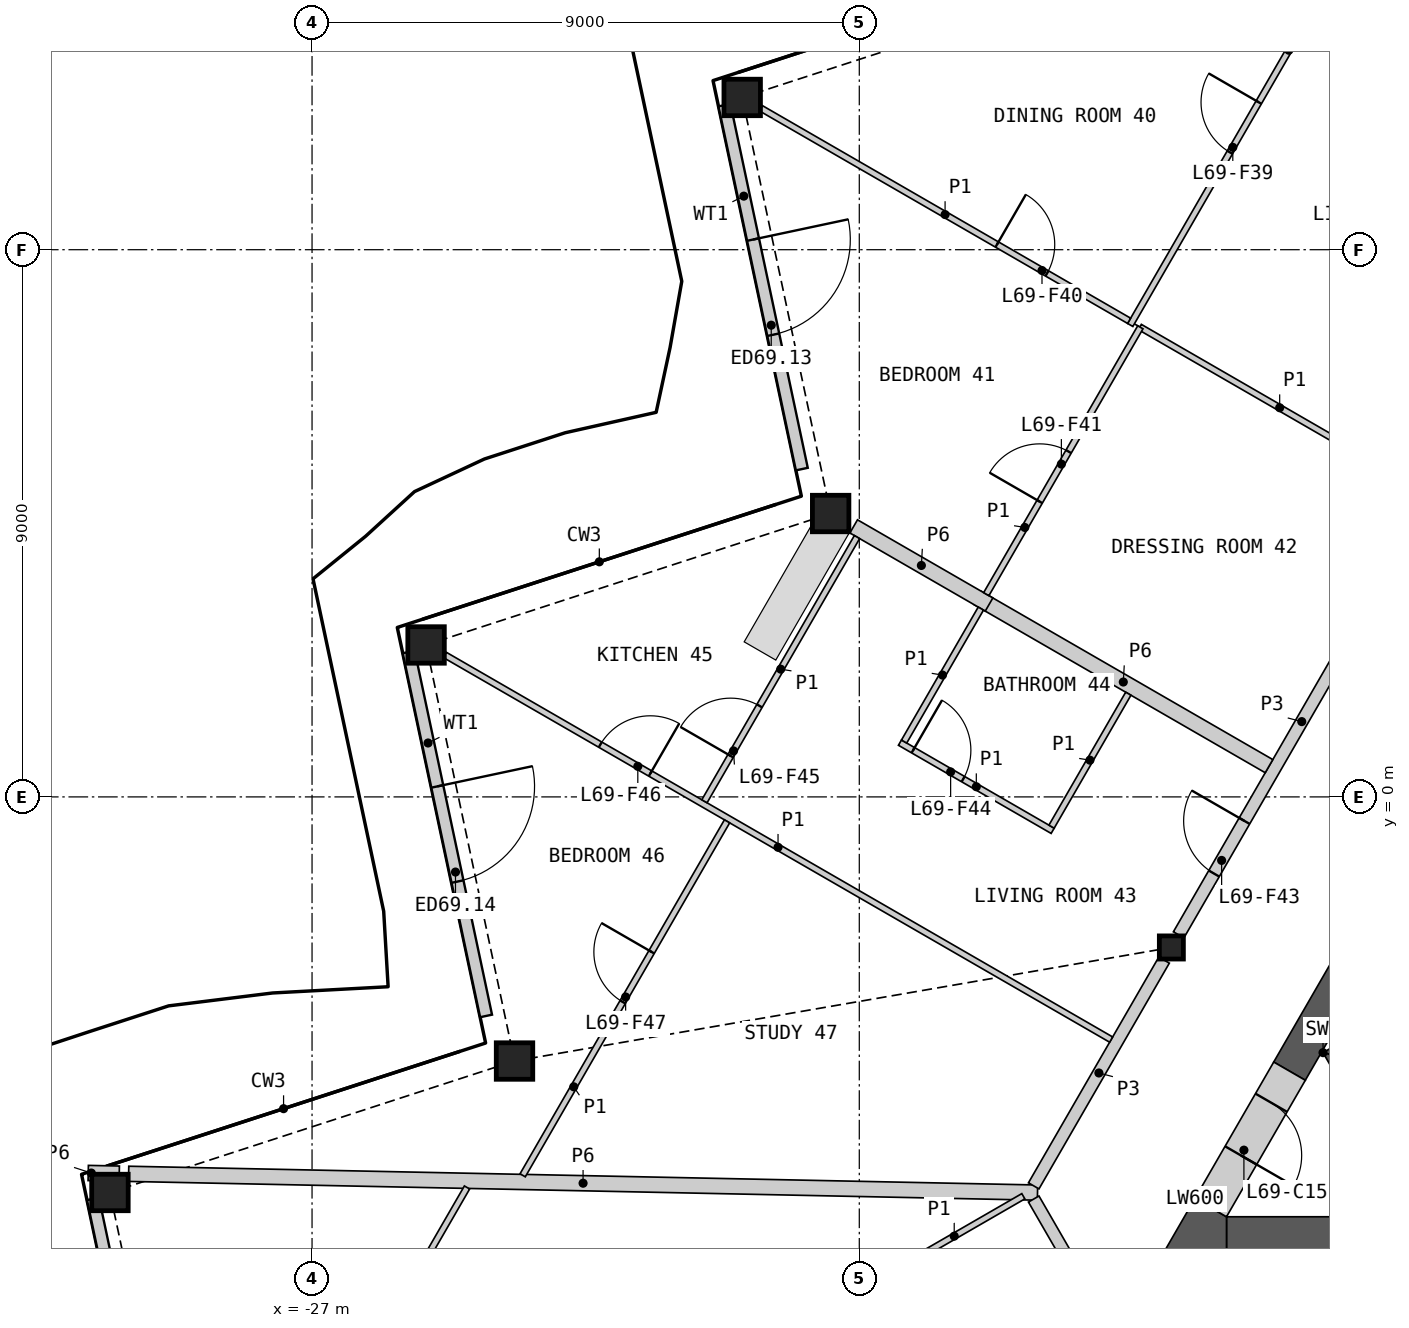
"""IFC4 building model, lengths in metres.
Left out: names, types, materials, properties, quantities, classifications, styles, units other than length and angle.
Written with IfcOpenShell. Run it as: python <this file> out.ifc"""

import sys

from ifc_helpers import new_model, si_unit, direction, frame, frame_2d, origin, origin_2d, place, context, subcontext, project, spatial, polyline, rectangle, hollow_rectangle, i_section, outline, extrude, element, fill, save


model = new_model("IFC4")
c1 = context("Model", 3, precision=1e-05, world=origin(), true_north=direction((0.0, 1.0)))
c2 = subcontext(c1, "Body", "Model", "MODEL_VIEW")
j1 = project(units=[si_unit("LENGTHUNIT", "METRE"), si_unit("PLANEANGLEUNIT", "RADIAN")], contexts=[c1])
p1 = place(None, origin())
s1 = spatial("IfcSite", under=j1, at=p1, CompositionType="ELEMENT")
p2 = place(p1, origin())
s2 = spatial("IfcBuilding", under=s1, at=p2, CompositionType="ELEMENT")
p3 = place(p2, frame((0.0, 0.0, 315.4)))
s3 = spatial("IfcBuildingStorey", under=s2, at=p3, CompositionType="ELEMENT", Elevation=315.4)
for number, where, z_axis, x_axis in (
    (1, (-19.926, 11.504, 0.0), (0.0, 0.0, 1.0), (1.0, 0.0, 0.0)),
    (2, (-18.471, 4.661, 0.0), (0.0, 0.0, 1.0), (1.0, 0.0, 0.0)),
    (3, (-25.125, 2.499, 0.0), (0.0, 0.0, 1.0), (1.0, 0.0, 0.0)),
    (4, (-23.67, -4.344, 0.0), (0.0, 0.0, 1.0), (1.0, 0.0, 0.0)),
    (5, (-30.324, -6.506, 0.0), (0.0, 0.0, 1.0), (1.0, 0.0, 0.0)),
):
    element("IfcColumn", number, at=place(p3, frame(where, z_axis=z_axis, x_axis=x_axis)), inside=s3, PredefinedType="COLUMN", context=c2, shape_type="SweptSolid", body=[
        extrude(hollow_rectangle(XDim=0.6, YDim=0.6, WallThickness=0.04, at=origin_2d()), origin(), (0.0, 0.0, 1.0), 3.4),
    ])
p4 = place(p3, frame((-12.868, -2.476, 0.0), z_axis=(0.0, 0.0, 1.0), x_axis=(1.0, 0.0, 0.0)))
e6 = element("IfcColumn", 6, at=p4, inside=s3, PredefinedType="COLUMN", context=c2, shape_type="SweptSolid", body=[
    extrude(i_section(OverallWidth=0.396, OverallDepth=0.381, WebThickness=0.019, FlangeThickness=0.03, at=origin_2d()), origin(), (0.0, 0.0, 1.0), 3.4),
])
p5 = place(p3, frame((-20.217, 11.377, 0.0), z_axis=(0.0, 0.0, 1.0), x_axis=(0.207885951908, -0.978153071354, 0.0)))
e7 = element("IfcWall", 7, at=p5, inside=s3, PredefinedType="SOLIDWALL", context=c2, shape_type="SweptSolid", body=[
    extrude(rectangle(XDim=6.12, YDim=0.2, at=frame_2d((3.06, 0.0))), origin(), (0.0, 0.0, 1.0), 2.488),
])
p6 = place(p5, frame((2.26, 0.0, 0.0)))
e8 = element("IfcOpeningElement", 8, at=p6, cuts=e7, PredefinedType="OPENING", context=c2, shape_type="SweptSolid", body=[
    extrude(rectangle(XDim=1.6, YDim=2.25, at=frame_2d((0.8, 1.125))), frame((0.0, 0.11, 0.0), z_axis=(0.0, -1.0, 0.0), x_axis=(1.0, 0.0, 0.0)), (0.0, 0.0, 1.0), 0.22),
])
p7 = place(p3, frame((-25.41, 2.383, 0.0), z_axis=(0.0, 0.0, 1.0), x_axis=(0.207894064368, -0.978151347185, 0.0)))
e9 = element("IfcWall", 9, at=p7, inside=s3, PredefinedType="SOLIDWALL", context=c2, shape_type="SweptSolid", body=[
    extrude(rectangle(XDim=6.12, YDim=0.2, at=frame_2d((3.06, 0.0))), origin(), (0.0, 0.0, 1.0), 2.488),
])
p8 = place(p7, frame((2.26, 0.0, 0.0)))
e10 = element("IfcOpeningElement", 10, at=p8, cuts=e9, PredefinedType="OPENING", context=c2, shape_type="SweptSolid", body=[
    extrude(rectangle(XDim=1.6, YDim=2.25, at=frame_2d((0.8, 1.125))), frame((0.0, 0.11, 0.0), z_axis=(0.0, -1.0, 0.0), x_axis=(1.0, 0.0, 0.0)), (0.0, 0.0, 1.0), 0.22),
])
p9 = place(p3, frame((-30.603, -6.611, 0.0), z_axis=(0.0, 0.0, 1.0), x_axis=(0.207921893309, -0.978145432072, 0.0)))
e11 = element("IfcWall", 11, at=p9, inside=s3, PredefinedType="SOLIDWALL", context=c2, shape_type="SweptSolid", body=[
    extrude(rectangle(XDim=6.475, YDim=0.2, at=frame_2d((3.237, 0.0))), origin(), (0.0, 0.0, 1.0), 2.488),
])
p10 = place(p9, frame((2.26, 0.0, 0.0)))
e12 = element("IfcOpeningElement", 12, at=p10, cuts=e11, PredefinedType="OPENING", context=c2, shape_type="SweptSolid", body=[
    extrude(rectangle(XDim=1.6, YDim=2.25, at=frame_2d((0.8, 1.125))), frame((0.0, 0.11, 0.0), z_axis=(0.0, -1.0, 0.0), x_axis=(1.0, 0.0, 0.0)), (0.0, 0.0, 1.0), 0.22),
])
p11 = place(p3, origin())
e13 = element("IfcWall", 13, at=p11, inside=s3, PredefinedType="SHEAR", context=c2, shape_type="SweptSolid", body=[
    extrude(outline(polyline([(-5.307, -1.281), (-10.374, -4.206), (-10.032, -4.298), (-5.182, -1.498), (-5.307, -1.281)])), origin(), (0.0, 0.0, 1.0), 3.1),
])
p12 = place(p3, origin())
e14 = element("IfcWall", 14, at=p12, inside=s3, PredefinedType="SHEAR", context=c2, shape_type="SweptSolid", body=[
    extrude(outline(polyline([(-10.374, -4.206), (-8.83, -6.881), (-8.738, -6.539), (-10.032, -4.298), (-10.374, -4.206)])), origin(), (0.0, 0.0, 1.0), 3.1),
])
p13 = place(p3, frame((-11.961, -7.206, 0.0), z_axis=(0.0, 0.0, 1.0), x_axis=(1.0, 0.0, 0.0)))
e15 = element("IfcWall", 15, at=p13, inside=s3, PredefinedType="SHEAR", context=c2, shape_type="SweptSolid", body=[
    extrude(rectangle(XDim=23.921, YDim=0.6, at=frame_2d((11.961, 0.0))), origin(), (0.0, 0.0, 1.0), 3.1),
])
p14 = place(p3, frame((-8.44, -0.208, 0.0), z_axis=(0.0, 0.0, 1.0), x_axis=(-0.500007425856, -0.866021116422, 0.0)))
e16 = element("IfcWall", 16, at=p14, inside=s3, PredefinedType="SHEAR", context=c2, shape_type="SweptSolid", body=[
    extrude(rectangle(XDim=4.969, YDim=0.6, at=frame_2d((2.484, 0.0))), origin(), (0.0, 0.0, 1.0), 3.1),
])
p15 = place(p3, origin())
e17 = element("IfcWall", 17, at=p15, inside=s3, PredefinedType="SHEAR", context=c2, shape_type="SweptSolid", body=[
    extrude(outline(polyline([(-12.48, -6.606), (-11.961, -6.906), (-11.961, -7.506), (-13.0, -7.506), (-12.48, -6.606)])), origin(), (0.0, 0.0, 1.0), 3.1),
])
p16 = place(p3, frame((-10.925, -4.511, 0.0), z_axis=(0.0, 0.0, 1.0), x_axis=(-0.500018667571, -0.866014625789, 0.0)))
e18 = element("IfcWall", 18, at=p16, inside=s3, PredefinedType="SHEAR", context=c2, shape_type="SweptSolid", body=[
    extrude(rectangle(XDim=2.592, YDim=0.6, at=frame_2d((1.296, 0.0))), origin(), (0.0, 0.0, 1.0), 3.1),
])
p17 = place(p16, frame((0.6, 0.0, 0.0)))
e19 = element("IfcOpeningElement", 19, at=p17, cuts=e18, PredefinedType="OPENING", context=c2, shape_type="SweptSolid", body=[
    extrude(rectangle(XDim=1.0, YDim=2.1, at=frame_2d((0.5, 1.05))), frame((0.0, 0.31, 0.0), z_axis=(0.0, -1.0, 0.0), x_axis=(1.0, 0.0, 0.0)), (0.0, 0.0, 1.0), 0.62),
])
p18 = place(p3, frame((-30.016, -6.199, 0.0), z_axis=(0.0, 0.0, 1.0), x_axis=(0.999786619639, -0.02065708573, 0.0)))
e20 = element("IfcWall", 20, at=p18, inside=s3, PredefinedType="PARTITIONING", context=c2, shape_type="SweptSolid", body=[
    extrude(rectangle(XDim=14.951, YDim=0.25, at=frame_2d((7.475, 0.0))), origin(), (0.0, 0.0, 1.0), 2.33),
])
p19 = place(p3, frame((-12.748, -2.269, 0.0), z_axis=(0.0, 0.0, 1.0), x_axis=(0.499984266882, 0.866034487114, 0.0)))
e21 = element("IfcWall", 21, at=p19, inside=s3, PredefinedType="PARTITIONING", context=c2, shape_type="SweptSolid", body=[
    extrude(rectangle(XDim=8.099, YDim=0.2, at=frame_2d((4.049, 0.0))), origin(), (0.0, 0.0, 1.0), 3.1),
])
p20 = place(p19, frame((1.164, 0.0, 0.0)))
e22 = element("IfcOpeningElement", 22, at=p20, cuts=e21, PredefinedType="OPENING", context=c2, shape_type="SweptSolid", body=[
    extrude(rectangle(XDim=1.0, YDim=2.1, at=frame_2d((0.5, 1.05))), frame((0.0, 0.11, 0.0), z_axis=(0.0, -1.0, 0.0), x_axis=(1.0, 0.0, 0.0)), (0.0, 0.0, 1.0), 0.22),
])
p21 = place(p3, frame((-16.055, 3.273, 0.0), z_axis=(0.0, 0.0, 1.0), x_axis=(0.866019581949, -0.500010083578, 0.0)))
e23 = element("IfcWall", 23, at=p21, inside=s3, PredefinedType="PARTITIONING", context=c2, shape_type="SweptSolid", body=[
    extrude(rectangle(XDim=5.535, YDim=0.25, at=frame_2d((2.768, 0.0))), origin(), (0.0, 0.0, 1.0), 2.33),
])
p22 = place(p3, frame((-15.131, -6.397, 0.0), z_axis=(0.0, 0.0, 1.0), x_axis=(0.500003406062, 0.866023437285, 0.0)))
e24 = element("IfcWall", 24, at=p22, inside=s3, PredefinedType="PARTITIONING", context=c2, shape_type="SweptSolid", body=[
    extrude(rectangle(XDim=4.288, YDim=0.2, at=frame_2d((2.144, 0.0))), origin(), (0.0, 0.0, 1.0), 3.1),
])
p23 = place(p3, frame((-15.131, -6.614, 0.0), z_axis=(0.0, 0.0, 1.0), x_axis=(0.499967746641, -0.866044024469, 0.0)))
e25 = element("IfcWall", 25, at=p23, inside=s3, PredefinedType="PARTITIONING", context=c2, shape_type="SweptSolid", body=[
    extrude(rectangle(XDim=3.676, YDim=0.2, at=frame_2d((1.838, 0.0))), origin(), (0.0, 0.0, 1.0), 3.1),
])
p24 = place(p23, frame((2.426, 0.0, 0.0)))
e26 = element("IfcOpeningElement", 26, at=p24, cuts=e25, PredefinedType="OPENING", context=c2, shape_type="SweptSolid", body=[
    extrude(rectangle(XDim=1.0, YDim=2.1, at=frame_2d((0.5, 1.05))), frame((0.0, 0.11, 0.0), z_axis=(0.0, -1.0, 0.0), x_axis=(1.0, 0.0, 0.0)), (0.0, 0.0, 1.0), 0.22),
])
p25 = place(p3, frame((-18.092, 4.449, 0.0), z_axis=(0.0, 0.0, 1.0), x_axis=(0.866043267704, -0.499969057507, 0.0)))
e27 = element("IfcWall", 27, at=p25, inside=s3, PredefinedType="PARTITIONING", context=c2, shape_type="SweptSolid", body=[
    extrude(rectangle(XDim=2.571, YDim=0.25, at=frame_2d((1.286, 0.0))), origin(), (0.0, 0.0, 1.0), 2.33),
])
p26 = place(p3, frame((-30.681, -6.186, 0.0), z_axis=(0.0, 0.0, 1.0), x_axis=(0.999788216533, -0.020579652135, 0.0)))
e28 = element("IfcWall", 28, at=p26, inside=s3, PredefinedType="PARTITIONING", context=c2, shape_type="SweptSolid", body=[
    extrude(rectangle(XDim=0.51, YDim=0.25, at=frame_2d((0.255, 0.0))), origin(), (0.0, 0.0, 1.0), 2.33),
])
p27 = place(p3, frame((-24.815, 2.334, 0.0), z_axis=(0.0, 0.0, 1.0), x_axis=(0.866024591023, -0.500001407741, 0.0)))
e29 = element("IfcWall", 29, at=p27, inside=s3, PredefinedType="PARTITIONING", context=c2, shape_type="SweptSolid", body=[
    extrude(rectangle(XDim=12.652, YDim=0.1, at=frame_2d((6.326, 0.0))), origin(), (0.0, 0.0, 1.0), 2.33),
])
p28 = place(p27, frame((2.95, 0.0, 0.0)))
e30 = element("IfcOpeningElement", 30, at=p28, cuts=e29, PredefinedType="OPENING", context=c2, shape_type="SweptSolid", body=[
    extrude(rectangle(XDim=0.95, YDim=2.1, at=frame_2d((0.475, 1.05))), frame((0.0, 0.06, 0.0), z_axis=(0.0, -1.0, 0.0), x_axis=(1.0, 0.0, 0.0)), (0.0, 0.0, 1.0), 0.12),
])
p29 = place(p3, frame((-13.544, 7.762, 0.0), z_axis=(0.0, 0.0, 1.0), x_axis=(0.499993819111, 0.866028972293, 0.0)))
e31 = element("IfcWall", 31, at=p29, inside=s3, PredefinedType="PARTITIONING", context=c2, shape_type="SweptSolid", body=[
    extrude(rectangle(XDim=10.436, YDim=0.1, at=frame_2d((5.218, 0.0))), origin(), (0.0, 0.0, 1.0), 2.33),
])
p30 = place(p29, frame((3.279, 0.0, 0.0)))
e32 = element("IfcOpeningElement", 32, at=p30, cuts=e31, PredefinedType="OPENING", context=c2, shape_type="SweptSolid", body=[
    extrude(rectangle(XDim=0.95, YDim=2.1, at=frame_2d((0.475, 1.05))), frame((0.0, 0.06, 0.0), z_axis=(0.0, -1.0, 0.0), x_axis=(1.0, 0.0, 0.0)), (0.0, 0.0, 1.0), 0.12),
])
p31 = place(p3, frame((-19.615, 11.325, 0.0), z_axis=(0.0, 0.0, 1.0), x_axis=(0.866013987544, -0.500019772988, 0.0)))
e33 = element("IfcWall", 33, at=p31, inside=s3, PredefinedType="PARTITIONING", context=c2, shape_type="SweptSolid", body=[
    extrude(rectangle(XDim=6.99, YDim=0.1, at=frame_2d((3.495, 0.0))), origin(), (0.0, 0.0, 1.0), 2.33),
])
p32 = place(p31, frame((4.48, 0.0, 0.0)))
e34 = element("IfcOpeningElement", 34, at=p32, cuts=e33, PredefinedType="OPENING", context=c2, shape_type="SweptSolid", body=[
    extrude(rectangle(XDim=0.95, YDim=2.1, at=frame_2d((0.475, 1.05))), frame((0.0, 0.06, 0.0), z_axis=(0.0, -1.0, 0.0), x_axis=(1.0, 0.0, 0.0)), (0.0, 0.0, 1.0), 0.12),
])
p33 = place(p3, frame((-23.536, -6.224, 0.0), z_axis=(0.0, 0.0, 1.0), x_axis=(0.500002256251, 0.866024101133, 0.0)))
e35 = element("IfcWall", 35, at=p33, inside=s3, PredefinedType="PARTITIONING", context=c2, shape_type="SweptSolid", body=[
    extrude(rectangle(XDim=6.722, YDim=0.1, at=frame_2d((3.361, 0.0))), origin(), (0.0, 0.0, 1.0), 2.33),
])
p34 = place(p33, frame((3.292, 0.0, 0.0)))
e36 = element("IfcOpeningElement", 36, at=p34, cuts=e35, PredefinedType="OPENING", context=c2, shape_type="SweptSolid", body=[
    extrude(rectangle(XDim=0.95, YDim=2.1, at=frame_2d((0.475, 1.05))), frame((0.0, 0.06, 0.0), z_axis=(0.0, -1.0, 0.0), x_axis=(1.0, 0.0, 0.0)), (0.0, 0.0, 1.0), 0.12),
])
p35 = place(p3, frame((-13.386, 7.729, 0.0), z_axis=(0.0, 0.0, 1.0), x_axis=(0.866034036823, -0.49998504684, 0.0)))
e37 = element("IfcWall", 37, at=p35, inside=s3, PredefinedType="PARTITIONING", context=c2, shape_type="SweptSolid", body=[
    extrude(rectangle(XDim=5.312, YDim=0.1, at=frame_2d((2.656, 0.0))), origin(), (0.0, 0.0, 1.0), 2.33),
])
p36 = place(p3, frame((-15.912, 3.335, 0.0), z_axis=(0.0, 0.0, 1.0), x_axis=(0.49999906822, 0.866025941747, 0.0)))
e38 = element("IfcWall", 38, at=p36, inside=s3, PredefinedType="PARTITIONING", context=c2, shape_type="SweptSolid", body=[
    extrude(rectangle(XDim=5.068, YDim=0.1, at=frame_2d((2.534, 0.0))), origin(), (0.0, 0.0, 1.0), 2.33),
])
p37 = place(p36, frame((1.757, 0.0, 0.0)))
e39 = element("IfcOpeningElement", 39, at=p37, cuts=e38, PredefinedType="OPENING", context=c2, shape_type="SweptSolid", body=[
    extrude(rectangle(XDim=0.95, YDim=2.1, at=frame_2d((0.475, 1.05))), frame((0.0, 0.06, 0.0), z_axis=(0.0, -1.0, 0.0), x_axis=(1.0, 0.0, 0.0)), (0.0, 0.0, 1.0), 0.12),
])
p38 = place(p3, frame((-20.547, -0.072, 0.0), z_axis=(0.0, 0.0, 1.0), x_axis=(0.499969537666, 0.866042990507, 0.0)))
e40 = element("IfcWall", 40, at=p38, inside=s3, PredefinedType="PARTITIONING", context=c2, shape_type="SweptSolid", body=[
    extrude(rectangle(XDim=5.018, YDim=0.1, at=frame_2d((2.509, 0.0))), origin(), (0.0, 0.0, 1.0), 2.33),
])
p39 = place(p38, frame((0.862, 0.0, 0.0)))
e41 = element("IfcOpeningElement", 41, at=p39, cuts=e40, PredefinedType="OPENING", context=c2, shape_type="SweptSolid", body=[
    extrude(rectangle(XDim=0.95, YDim=2.1, at=frame_2d((0.475, 1.05))), frame((0.0, 0.06, 0.0), z_axis=(0.0, -1.0, 0.0), x_axis=(1.0, 0.0, 0.0)), (0.0, 0.0, 1.0), 0.12),
])
p40 = place(p3, frame((-26.736, -10.38, 0.0), z_axis=(0.0, 0.0, 1.0), x_axis=(0.500024700597, 0.866011142419, 0.0)))
e42 = element("IfcWall", 42, at=p40, inside=s3, PredefinedType="PARTITIONING", context=c2, shape_type="SweptSolid", body=[
    extrude(rectangle(XDim=4.568, YDim=0.1, at=frame_2d((2.284, 0.0))), origin(), (0.0, 0.0, 1.0), 2.33),
])
p41 = place(p40, frame((0.652, 0.0, 0.0)))
e43 = element("IfcOpeningElement", 43, at=p41, cuts=e42, PredefinedType="OPENING", context=c2, shape_type="SweptSolid", body=[
    extrude(rectangle(XDim=0.95, YDim=2.1, at=frame_2d((0.475, 1.05))), frame((0.0, 0.06, 0.0), z_axis=(0.0, -1.0, 0.0), x_axis=(1.0, 0.0, 0.0)), (0.0, 0.0, 1.0), 0.12),
])
p42 = place(p3, frame((-17.331, 0.892, 0.0), z_axis=(0.0, 0.0, 1.0), x_axis=(0.866032775405, -0.499987231761, 0.0)))
e44 = element("IfcWall", 44, at=p42, inside=s3, PredefinedType="PARTITIONING", context=c2, shape_type="SweptSolid", body=[
    extrude(rectangle(XDim=2.9, YDim=0.1, at=frame_2d((1.45, 0.0))), origin(), (0.0, 0.0, 1.0), 2.33),
])
p43 = place(p42, frame((0.25, 0.0, 0.0)))
e45 = element("IfcOpeningElement", 45, at=p43, cuts=e44, PredefinedType="OPENING", context=c2, shape_type="SweptSolid", body=[
    extrude(rectangle(XDim=0.95, YDim=2.1, at=frame_2d((0.475, 1.05))), frame((0.0, 0.06, 0.0), z_axis=(0.0, -1.0, 0.0), x_axis=(1.0, 0.0, 0.0)), (0.0, 0.0, 1.0), 0.12),
])
for number, where, z_axis, x_axis in (
    (46, (-14.838, -0.489, 0.0), (0.0, 0.0, 1.0), (0.5, 0.866, 0.0)),
    (47, (-17.263, 0.911, 0.0), (0.0, 0.0, 1.0), (0.5, 0.866, 0.0)),
):
    element("IfcWall", number, at=place(p3, frame(where, z_axis=z_axis, x_axis=x_axis)), inside=s3, PredefinedType="PARTITIONING", context=c2, shape_type="SweptSolid", body=[
        extrude(rectangle(XDim=2.525, YDim=0.1, at=frame_2d((1.262, 0.0))), origin(), (0.0, 0.0, 1.0), 2.33),
    ])
p44 = place(p3, frame((-17.575, -7.881, 0.0), z_axis=(0.0, 0.0, 1.0), x_axis=(0.866013657776, 0.500020344131, 0.0)))
e48 = element("IfcWall", 48, at=p44, inside=s3, PredefinedType="PARTITIONING", context=c2, shape_type="SweptSolid", body=[
    extrude(rectangle(XDim=2.625, YDim=0.1, at=frame_2d((1.312, 0.0))), origin(), (0.0, 0.0, 1.0), 2.33),
])
p45 = place(p6, origin())
e49 = element("IfcDoor", 49, at=p45, inside=s3, OperationType="DOUBLE_DOOR_SINGLE_SWING", PredefinedType="DOOR", context=c2, shape_type="SweptSolid", body=[
    extrude(rectangle(XDim=1.6, YDim=2.25, at=frame_2d((0.8, 1.125))), frame((0.0, 0.025, 0.0), z_axis=(0.0, -1.0, 0.0), x_axis=(1.0, 0.0, 0.0)), (0.0, 0.0, 1.0), 0.05),
])
fill(e8, e49)
p46 = place(p8, origin())
e50 = element("IfcDoor", 50, at=p46, inside=s3, OperationType="DOUBLE_DOOR_SINGLE_SWING", PredefinedType="DOOR", context=c2, shape_type="SweptSolid", body=[
    extrude(rectangle(XDim=1.6, YDim=2.25, at=frame_2d((0.8, 1.125))), frame((0.0, 0.025, 0.0), z_axis=(0.0, -1.0, 0.0), x_axis=(1.0, 0.0, 0.0)), (0.0, 0.0, 1.0), 0.05),
])
fill(e10, e50)
p47 = place(p17, origin())
e51 = element("IfcDoor", 51, at=p47, inside=s3, OperationType="SINGLE_SWING_RIGHT", PredefinedType="DOOR", context=c2, shape_type="SweptSolid", body=[
    extrude(rectangle(XDim=1.0, YDim=2.1, at=frame_2d((0.5, 1.05))), frame((0.0, 0.055, 0.0), z_axis=(0.0, -1.0, 0.0), x_axis=(1.0, 0.0, 0.0)), (0.0, 0.0, 1.0), 0.05),
])
fill(e19, e51)
p48 = place(p30, origin())
e52 = element("IfcDoor", 52, at=p48, inside=s3, OperationType="SINGLE_SWING_RIGHT", PredefinedType="DOOR", context=c2, shape_type="SweptSolid", body=[
    extrude(rectangle(XDim=0.95, YDim=2.1, at=frame_2d((0.475, 1.05))), frame((0.0, 0.025, 0.0), z_axis=(0.0, -1.0, 0.0), x_axis=(1.0, 0.0, 0.0)), (0.0, 0.0, 1.0), 0.05),
])
fill(e32, e52)
p49 = place(p32, origin())
e53 = element("IfcDoor", 53, at=p49, inside=s3, OperationType="SINGLE_SWING_LEFT", PredefinedType="DOOR", context=c2, shape_type="SweptSolid", body=[
    extrude(rectangle(XDim=0.95, YDim=2.1, at=frame_2d((0.475, 1.05))), frame((0.0, 0.025, 0.0), z_axis=(0.0, -1.0, 0.0), x_axis=(1.0, 0.0, 0.0)), (0.0, 0.0, 1.0), 0.05),
])
fill(e34, e53)
p50 = place(p37, origin())
e54 = element("IfcDoor", 54, at=p50, inside=s3, OperationType="SINGLE_SWING_LEFT", PredefinedType="DOOR", context=c2, shape_type="SweptSolid", body=[
    extrude(rectangle(XDim=0.95, YDim=2.1, at=frame_2d((0.475, 1.05))), frame((0.0, 0.025, 0.0), z_axis=(0.0, -1.0, 0.0), x_axis=(1.0, 0.0, 0.0)), (0.0, 0.0, 1.0), 0.05),
])
fill(e39, e54)
p51 = place(p20, origin())
e55 = element("IfcDoor", 55, at=p51, inside=s3, OperationType="SINGLE_SWING_RIGHT", PredefinedType="DOOR", context=c2, shape_type="SweptSolid", body=[
    extrude(rectangle(XDim=1.0, YDim=2.1, at=frame_2d((0.5, 1.05))), frame((0.0, 0.025, 0.0), z_axis=(0.0, -1.0, 0.0), x_axis=(1.0, 0.0, 0.0)), (0.0, 0.0, 1.0), 0.05),
])
fill(e22, e55)
p52 = place(p43, origin())
e56 = element("IfcDoor", 56, at=p52, inside=s3, OperationType="SINGLE_SWING_LEFT", PredefinedType="DOOR", context=c2, shape_type="SweptSolid", body=[
    extrude(rectangle(XDim=0.95, YDim=2.1, at=frame_2d((0.475, 1.05))), frame((0.0, 0.025, 0.0), z_axis=(0.0, -1.0, 0.0), x_axis=(1.0, 0.0, 0.0)), (0.0, 0.0, 1.0), 0.05),
])
fill(e45, e56)
p53 = place(p39, origin())
e57 = element("IfcDoor", 57, at=p53, inside=s3, OperationType="SINGLE_SWING_LEFT", PredefinedType="DOOR", context=c2, shape_type="SweptSolid", body=[
    extrude(rectangle(XDim=0.95, YDim=2.1, at=frame_2d((0.475, 1.05))), frame((0.0, 0.025, 0.0), z_axis=(0.0, -1.0, 0.0), x_axis=(1.0, 0.0, 0.0)), (0.0, 0.0, 1.0), 0.05),
])
fill(e41, e57)
p54 = place(p28, origin())
e58 = element("IfcDoor", 58, at=p54, inside=s3, OperationType="SINGLE_SWING_RIGHT", PredefinedType="DOOR", context=c2, shape_type="SweptSolid", body=[
    extrude(rectangle(XDim=0.95, YDim=2.1, at=frame_2d((0.475, 1.05))), frame((0.0, 0.025, 0.0), z_axis=(0.0, -1.0, 0.0), x_axis=(1.0, 0.0, 0.0)), (0.0, 0.0, 1.0), 0.05),
])
fill(e30, e58)
p55 = place(p34, origin())
e59 = element("IfcDoor", 59, at=p55, inside=s3, OperationType="SINGLE_SWING_RIGHT", PredefinedType="DOOR", context=c2, shape_type="SweptSolid", body=[
    extrude(rectangle(XDim=0.95, YDim=2.1, at=frame_2d((0.475, 1.05))), frame((0.0, 0.025, 0.0), z_axis=(0.0, -1.0, 0.0), x_axis=(1.0, 0.0, 0.0)), (0.0, 0.0, 1.0), 0.05),
])
fill(e36, e59)
save(model, sys.argv[1])
